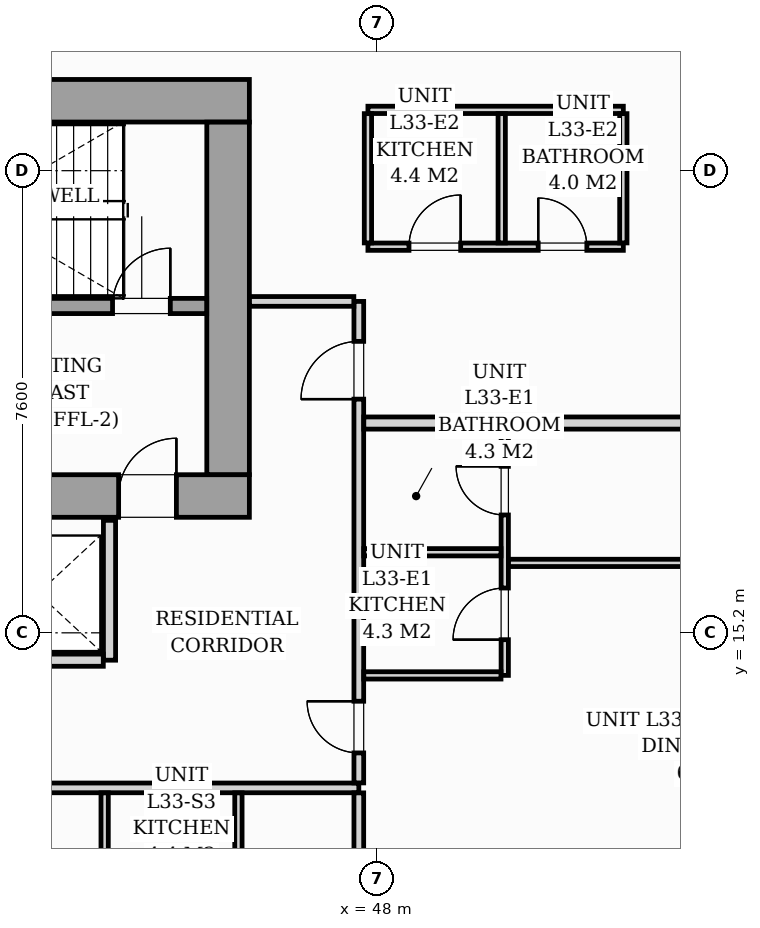
"""IFC4 building model, lengths in metres.
Left out: names, types, materials, properties, quantities, classifications, styles, units other than length and angle.
Written with IfcOpenShell. Run it as: python <this file> out.ifc"""

import sys

from ifc_helpers import new_model, si_unit, direction, frame, frame_2d, origin, origin_2d, place, context, subcontext, project, spatial, rectangle, i_section, extrude, source, transform, mapped, element, fill, save


model = new_model("IFC4")
c1 = context("Model", 3, precision=1e-05, world=origin(), true_north=direction((0.0, 1.0)))
c2 = subcontext(c1, "Body", "Model", "MODEL_VIEW")
j1 = project(units=[si_unit("LENGTHUNIT", "METRE"), si_unit("PLANEANGLEUNIT", "RADIAN")], contexts=[c1])
p1 = place(None, origin())
s1 = spatial("IfcSite", under=j1, at=p1, CompositionType="ELEMENT")
p2 = place(p1, origin())
s2 = spatial("IfcBuilding", under=s1, at=p2, CompositionType="ELEMENT")
p3 = place(p2, frame((0.0, 0.0, 116.2)))
s3 = spatial("IfcBuildingStorey", under=s2, at=p3, CompositionType="ELEMENT", Elevation=116.2)
m1 = source(origin(), c2, "Body", "SweptSolid", [
    extrude(i_section(OverallWidth=0.427, OverallDepth=0.483, WebThickness=0.051, FlangeThickness=0.082, FilletRadius=0.018, at=origin_2d()), origin(), (0.0, 0.0, 1.0), 3.196),
])
for number, where, z_axis, x_axis in (
    (1, (45.6, 17.4, 0.002), (0.0, 0.0, 1.0), (1.0, 0.0, 0.0)),
    (2, (45.6, 24.0, 0.002), (0.0, 0.0, 1.0), (1.0, 0.0, 0.0)),
):
    element("IfcColumn", number, at=place(p3, frame(where, z_axis=z_axis, x_axis=x_axis)), inside=s3, PredefinedType="PILASTER", context=c2, shape_type="MappedRepresentation", body=[
        mapped(m1, transform((0.0, 0.0, 0.0), scale=1.0)),
    ])
p4 = place(p3, frame((26.1, 17.45, 0.0), z_axis=(0.0, 0.0, 1.0), x_axis=(1.0, 0.0, 0.0)))
e3 = element("IfcWall", 3, at=p4, inside=s3, PredefinedType="SHEAR", context=c2, shape_type="SweptSolid", body=[
    extrude(rectangle(XDim=19.8, YDim=0.7, at=frame_2d((9.9, 0.0))), origin(), (0.0, 0.0, 1.0), 3.2),
])
p5 = place(p4, frame((1.05, 0.0, 0.0)))
e4 = element("IfcOpeningElement", 4, at=p5, cuts=e3, PredefinedType="OPENING", context=c2, shape_type="SweptSolid", body=[
    extrude(rectangle(XDim=0.95, YDim=2.06, at=frame_2d((0.475, 1.03))), frame((0.0, 0.36, 0.0), z_axis=(0.0, -1.0, 0.0), x_axis=(1.0, 0.0, 0.0)), (0.0, 0.0, 1.0), 0.72),
])
p6 = place(p4, frame((9.48, 0.0, 0.0)))
e5 = element("IfcOpeningElement", 5, at=p6, cuts=e3, PredefinedType="OPENING", context=c2, shape_type="SweptSolid", body=[
    extrude(rectangle(XDim=0.85, YDim=2.0, at=frame_2d((0.425, 1.0))), frame((0.0, 0.36, 0.0), z_axis=(0.0, -1.0, 0.0), x_axis=(1.0, 0.0, 0.0)), (0.0, 0.0, 1.0), 0.72),
])
p7 = place(p4, frame((17.65, 0.0, 0.0)))
e6 = element("IfcOpeningElement", 6, at=p7, cuts=e3, PredefinedType="OPENING", context=c2, shape_type="SweptSolid", body=[
    extrude(rectangle(XDim=0.95, YDim=2.06, at=frame_2d((0.475, 1.03))), frame((0.0, 0.36, 0.0), z_axis=(0.0, -1.0, 0.0), x_axis=(1.0, 0.0, 0.0)), (0.0, 0.0, 1.0), 0.72),
])
p8 = place(p3, frame((26.1, 23.95, 0.0), z_axis=(0.0, 0.0, 1.0), x_axis=(1.0, 0.0, 0.0)))
e7 = element("IfcWall", 7, at=p8, inside=s3, PredefinedType="SHEAR", context=c2, shape_type="SweptSolid", body=[
    extrude(rectangle(XDim=19.8, YDim=0.7, at=frame_2d((9.9, 0.0))), origin(), (0.0, 0.0, 1.0), 3.2),
])
p9 = place(p3, frame((45.55, 17.802, 0.0), z_axis=(0.0, 0.0, 1.0), x_axis=(0.0, 1.0, 0.0)))
e8 = element("IfcWall", 8, at=p9, inside=s3, PredefinedType="SHEAR", context=c2, shape_type="SweptSolid", body=[
    extrude(rectangle(XDim=5.796, YDim=0.7, at=frame_2d((2.898, 0.0))), origin(), (0.0, 0.0, 1.0), 3.2),
])
p10 = place(p3, frame((37.05, 20.575, 0.0), z_axis=(0.0, 0.0, 1.0), x_axis=(1.0, 0.0, 0.0)))
e9 = element("IfcWall", 9, at=p10, inside=s3, PredefinedType="SOLIDWALL", context=c2, shape_type="SweptSolid", body=[
    extrude(rectangle(XDim=8.148, YDim=0.25, at=frame_2d((4.074, 0.0))), origin(), (0.0, 0.0, 1.0), 3.2),
])
p11 = place(p10, frame((6.6, 0.0, 0.0)))
e10 = element("IfcOpeningElement", 10, at=p11, cuts=e9, PredefinedType="OPENING", context=c2, shape_type="SweptSolid", body=[
    extrude(rectangle(XDim=0.95, YDim=2.06, at=frame_2d((0.475, 1.03))), frame((0.0, 0.135, 0.0), z_axis=(0.0, -1.0, 0.0), x_axis=(1.0, 0.0, 0.0)), (0.0, 0.0, 1.0), 0.27),
])
p12 = place(p3, frame((43.6, 14.75, 0.0), z_axis=(0.0, 0.0, 1.0), x_axis=(0.0, 1.0, 0.0)))
e11 = element("IfcWall", 11, at=p12, inside=s3, PredefinedType="PARTITIONING", context=c2, shape_type="SweptSolid", body=[
    extrude(rectangle(XDim=2.3, YDim=0.2, at=frame_2d((1.15, 0.0))), origin(), (0.0, 0.0, 1.0), 2.9),
])
p13 = place(p3, frame((41.352, 14.75, 0.0), z_axis=(0.0, 0.0, 1.0), x_axis=(1.0, 0.0, 0.0)))
e12 = element("IfcWall", 12, at=p13, inside=s3, PredefinedType="PARTITIONING", context=c2, shape_type="SweptSolid", body=[
    extrude(rectangle(XDim=2.146, YDim=0.2, at=frame_2d((1.073, 0.0))), origin(), (0.0, 0.0, 1.0), 2.9),
])
p14 = place(p3, frame((21.5, 12.65, 0.0), z_axis=(0.0, 0.0, 1.0), x_axis=(1.0, 0.0, 0.0)))
e13 = element("IfcWall", 13, at=p14, inside=s3, PredefinedType="PARTITIONING", context=c2, shape_type="SweptSolid", body=[
    extrude(rectangle(XDim=26.2, YDim=0.16, at=frame_2d((13.1, 0.0))), origin(), (0.0, 0.0, 1.0), 2.9),
])
p15 = place(p14, frame((5.927, 0.0, 0.0)))
e14 = element("IfcOpeningElement", 14, at=p15, cuts=e13, PredefinedType="OPENING", context=c2, shape_type="SweptSolid", body=[
    extrude(rectangle(XDim=0.95, YDim=2.06, at=frame_2d((0.475, 1.03))), frame((0.0, 0.09, 0.0), z_axis=(0.0, -1.0, 0.0), x_axis=(1.0, 0.0, 0.0)), (0.0, 0.0, 1.0), 0.18),
])
p16 = place(p14, frame((10.575, 0.0, 0.0)))
e15 = element("IfcOpeningElement", 15, at=p16, cuts=e13, PredefinedType="OPENING", context=c2, shape_type="SweptSolid", body=[
    extrude(rectangle(XDim=0.95, YDim=2.06, at=frame_2d((0.475, 1.03))), frame((0.0, 0.09, 0.0), z_axis=(0.0, -1.0, 0.0), x_axis=(1.0, 0.0, 0.0)), (0.0, 0.0, 1.0), 0.18),
])
p17 = place(p14, frame((19.322, 0.0, 0.0)))
e16 = element("IfcOpeningElement", 16, at=p17, cuts=e13, PredefinedType="OPENING", context=c2, shape_type="SweptSolid", body=[
    extrude(rectangle(XDim=0.95, YDim=2.06, at=frame_2d((0.475, 1.03))), frame((0.0, 0.09, 0.0), z_axis=(0.0, -1.0, 0.0), x_axis=(1.0, 0.0, 0.0)), (0.0, 0.0, 1.0), 0.18),
])
p18 = place(p3, frame((47.7, 7.153, 0.0), z_axis=(0.0, 0.0, 1.0), x_axis=(0.0, 1.0, 0.0)))
e17 = element("IfcWall", 17, at=p18, inside=s3, PredefinedType="PARTITIONING", context=c2, shape_type="SweptSolid", body=[
    extrude(rectangle(XDim=5.416, YDim=0.16, at=frame_2d((2.708, 0.0))), origin(), (0.0, 0.0, 1.0), 2.9),
])
p19 = place(p3, frame((47.7, 12.732, 0.0), z_axis=(0.0, 0.0, 1.0), x_axis=(0.0, 1.0, 0.0)))
e18 = element("IfcWall", 18, at=p19, inside=s3, PredefinedType="PARTITIONING", context=c2, shape_type="SweptSolid", body=[
    extrude(rectangle(XDim=7.918, YDim=0.16, at=frame_2d((3.959, 0.0))), origin(), (0.0, 0.0, 1.0), 2.9),
])
p20 = place(p19, frame((0.493, 0.0, 0.0)))
e19 = element("IfcOpeningElement", 19, at=p20, cuts=e18, PredefinedType="OPENING", context=c2, shape_type="SweptSolid", body=[
    extrude(rectangle(XDim=0.85, YDim=2.0, at=frame_2d((0.425, 1.0))), frame((0.0, 0.09, 0.0), z_axis=(0.0, -1.0, 0.0), x_axis=(1.0, 0.0, 0.0)), (0.0, 0.0, 1.0), 0.18),
])
p21 = place(p19, frame((6.311, 0.0, 0.0)))
e20 = element("IfcOpeningElement", 20, at=p21, cuts=e18, PredefinedType="OPENING", context=c2, shape_type="SweptSolid", body=[
    extrude(rectangle(XDim=0.95, YDim=2.06, at=frame_2d((0.475, 1.03))), frame((0.0, 0.09, 0.0), z_axis=(0.0, -1.0, 0.0), x_axis=(1.0, 0.0, 0.0)), (0.0, 0.0, 1.0), 0.18),
])
p22 = place(p3, frame((45.902, 20.65, 0.0), z_axis=(0.0, 0.0, 1.0), x_axis=(1.0, 0.0, 0.0)))
e21 = element("IfcWall", 21, at=p22, inside=s3, PredefinedType="PARTITIONING", context=c2, shape_type="SweptSolid", body=[
    extrude(rectangle(XDim=1.716, YDim=0.16, at=frame_2d((0.858, 0.0))), origin(), (0.0, 0.0, 1.0), 2.9),
])
for number, where, z_axis, x_axis in (
    (22, (43.52, 10.462, 0.0), (0.0, 0.0, 1.0), (0.0, 1.0, 0.0)),
    (23, (45.72, 10.462, 0.0), (0.0, 0.0, 1.0), (0.0, 1.0, 0.0)),
):
    element("IfcWall", number, at=place(p3, frame(where, z_axis=z_axis, x_axis=x_axis)), inside=s3, PredefinedType="PARTITIONING", context=c2, shape_type="SweptSolid", body=[
        extrude(rectangle(XDim=2.106, YDim=0.12, at=frame_2d((1.053, 0.0))), origin(), (0.0, 0.0, 1.0), 2.9),
    ])
p23 = place(p3, frame((47.782, 18.65, 0.0), z_axis=(0.0, 0.0, 1.0), x_axis=(1.0, 0.0, 0.0)))
e24 = element("IfcWall", 24, at=p23, inside=s3, PredefinedType="PARTITIONING", context=c2, shape_type="SweptSolid", body=[
    extrude(rectangle(XDim=21.049, YDim=0.2, at=frame_2d((10.525, 0.0))), origin(), (0.0, 0.0, 1.0), 2.023),
])
p24 = place(p3, frame((50.1, 14.5, 0.0), z_axis=(0.0, 0.0, 1.0), x_axis=(0.0, 1.0, 0.0)))
e25 = element("IfcWall", 25, at=p24, inside=s3, PredefinedType="PARTITIONING", context=c2, shape_type="SweptSolid", body=[
    extrude(rectangle(XDim=4.048, YDim=0.12, at=frame_2d((2.024, 0.0))), origin(), (0.0, 0.0, 1.0), 2.9),
])
p25 = place(p24, frame((0.587, 0.0, 0.0)))
e26 = element("IfcOpeningElement", 26, at=p25, cuts=e25, PredefinedType="OPENING", context=c2, shape_type="SweptSolid", body=[
    extrude(rectangle(XDim=0.85, YDim=2.05, at=frame_2d((0.425, 1.025))), frame((0.0, 0.07, 0.0), z_axis=(0.0, -1.0, 0.0), x_axis=(1.0, 0.0, 0.0)), (0.0, 0.0, 1.0), 0.14),
])
p26 = place(p24, frame((2.638, 0.0, 0.0)))
e27 = element("IfcOpeningElement", 27, at=p26, cuts=e25, PredefinedType="OPENING", context=c2, shape_type="SweptSolid", body=[
    extrude(rectangle(XDim=0.8, YDim=2.0, at=frame_2d((0.4, 1.0))), frame((0.0, 0.07, 0.0), z_axis=(0.0, -1.0, 0.0), x_axis=(1.0, 0.0, 0.0)), (0.0, 0.0, 1.0), 0.14),
])
for number, where, z_axis, x_axis in (
    (28, (47.782, 16.525, 0.0), (0.0, 0.0, 1.0), (1.0, 0.0, 0.0)),
    (29, (47.782, 14.5, 0.0), (0.0, 0.0, 1.0), (1.0, 0.0, 0.0)),
):
    element("IfcWall", number, at=place(p3, frame(where, z_axis=z_axis, x_axis=x_axis)), inside=s3, PredefinedType="PARTITIONING", context=c2, shape_type="SweptSolid", body=[
        extrude(rectangle(XDim=2.256, YDim=0.12, at=frame_2d((1.128, 0.0))), origin(), (0.0, 0.0, 1.0), 2.9),
    ])
p27 = place(p3, frame((50.162, 16.35, 0.0), z_axis=(0.0, 0.0, 1.0), x_axis=(1.0, 0.0, 0.0)))
e30 = element("IfcWall", 30, at=p27, inside=s3, PredefinedType="PARTITIONING", context=c2, shape_type="SweptSolid", body=[
    extrude(rectangle(XDim=16.092, YDim=0.12, at=frame_2d((8.046, 0.0))), origin(), (0.0, 0.0, 1.0), 2.9),
])
p28 = place(p27, frame((7.621, 0.0, 0.0)))
e31 = element("IfcOpeningElement", 31, at=p28, cuts=e30, PredefinedType="OPENING", context=c2, shape_type="SweptSolid", body=[
    extrude(rectangle(XDim=0.85, YDim=2.05, at=frame_2d((0.425, 1.025))), frame((0.0, 0.07, 0.0), z_axis=(0.0, -1.0, 0.0), x_axis=(1.0, 0.0, 0.0)), (0.0, 0.0, 1.0), 0.14),
])
p29 = place(p3, frame((47.85, 21.55, 0.0), z_axis=(0.0, 0.0, 1.0), x_axis=(1.0, 0.0, 0.0)))
e32 = element("IfcWall", 32, at=p29, inside=s3, PredefinedType="PARTITIONING", context=c2, shape_type="SweptSolid", body=[
    extrude(rectangle(XDim=4.2, YDim=0.12, at=frame_2d((2.1, 0.0))), origin(), (0.0, 0.0, 1.0), 2.9),
])
p30 = place(p29, frame((0.675, 0.0, 0.0)))
e33 = element("IfcOpeningElement", 33, at=p30, cuts=e32, PredefinedType="OPENING", context=c2, shape_type="SweptSolid", body=[
    extrude(rectangle(XDim=0.85, YDim=2.05, at=frame_2d((0.425, 1.025))), frame((0.0, 0.07, 0.0), z_axis=(0.0, -1.0, 0.0), x_axis=(1.0, 0.0, 0.0)), (0.0, 0.0, 1.0), 0.14),
])
p31 = place(p29, frame((2.8, 0.0, 0.0)))
e34 = element("IfcOpeningElement", 34, at=p31, cuts=e32, PredefinedType="OPENING", context=c2, shape_type="SweptSolid", body=[
    extrude(rectangle(XDim=0.8, YDim=2.02, at=frame_2d((0.4, 1.01))), frame((0.0, 0.07, 0.0), z_axis=(0.0, -1.0, 0.0), x_axis=(1.0, 0.0, 0.0)), (0.0, 0.0, 1.0), 0.14),
])
p32 = place(p3, frame((47.85, 23.8, 0.0), z_axis=(0.0, 0.0, 1.0), x_axis=(1.0, 0.0, 0.0)))
e35 = element("IfcWall", 35, at=p32, inside=s3, PredefinedType="PARTITIONING", context=c2, shape_type="SweptSolid", body=[
    extrude(rectangle(XDim=4.2, YDim=0.12, at=frame_2d((2.1, 0.0))), origin(), (0.0, 0.0, 1.0), 2.9),
])
for number, where, z_axis, x_axis in (
    (36, (47.85, 21.612, 0.0), (0.0, 0.0, 1.0), (0.0, 1.0, 0.0)),
    (37, (50.05, 21.612, 0.0), (0.0, 0.0, 1.0), (0.0, 1.0, 0.0)),
    (38, (52.05, 21.612, 0.0), (0.0, 0.0, 1.0), (0.0, 1.0, 0.0)),
):
    element("IfcWall", number, at=place(p3, frame(where, z_axis=z_axis, x_axis=x_axis)), inside=s3, PredefinedType="PARTITIONING", context=c2, shape_type="SweptSolid", body=[
        extrude(rectangle(XDim=2.126, YDim=0.12, at=frame_2d((1.063, 0.0))), origin(), (0.0, 0.0, 1.0), 2.9),
    ])
m2 = source(origin(), c2, "Body", "SweptSolid", [
    extrude(rectangle(XDim=0.95, YDim=2.06, at=frame_2d((0.475, 1.03))), frame((0.0, 0.025, 0.0), z_axis=(0.0, -1.0, 0.0), x_axis=(1.0, 0.0, 0.0)), (0.0, 0.0, 1.0), 0.05),
])
p33 = place(p7, origin())
e39 = element("IfcDoor", 39, at=p33, inside=s3, OperationType="SINGLE_SWING_RIGHT", PredefinedType="DOOR", context=c2, shape_type="MappedRepresentation", body=[
    mapped(m2, transform((0.0, 0.0, 0.0), scale=1.0)),
])
fill(e6, e39)
p34 = place(p11, origin())
e40 = element("IfcDoor", 40, at=p34, inside=s3, OperationType="SINGLE_SWING_RIGHT", PredefinedType="DOOR", context=c2, shape_type="MappedRepresentation", body=[
    mapped(m2, transform((0.0, 0.0, 0.0), scale=1.0)),
])
fill(e10, e40)
m3 = source(origin(), c2, "Body", "SweptSolid", [
    extrude(rectangle(XDim=0.85, YDim=2.0, at=frame_2d((0.425, 1.0))), frame((0.0, 0.025, 0.0), z_axis=(0.0, -1.0, 0.0), x_axis=(1.0, 0.0, 0.0)), (0.0, 0.0, 1.0), 0.05),
])
p35 = place(p20, origin())
e41 = element("IfcDoor", 41, at=p35, inside=s3, OperationType="SINGLE_SWING_RIGHT", PredefinedType="DOOR", context=c2, shape_type="MappedRepresentation", body=[
    mapped(m3, transform((0.0, 0.0, 0.0), scale=1.0)),
])
fill(e19, e41)
m4 = source(origin(), c2, "Body", "SweptSolid", [
    extrude(rectangle(XDim=0.85, YDim=2.05, at=frame_2d((0.425, 1.025))), frame((0.0, 0.025, 0.0), z_axis=(0.0, -1.0, 0.0), x_axis=(1.0, 0.0, 0.0)), (0.0, 0.0, 1.0), 0.05),
])
p36 = place(p25, origin())
e42 = element("IfcDoor", 42, at=p36, inside=s3, OperationType="SINGLE_SWING_LEFT", PredefinedType="DOOR", context=c2, shape_type="MappedRepresentation", body=[
    mapped(m4, transform((0.0, 0.0, 0.0), scale=1.0)),
])
fill(e26, e42)
m5 = source(origin(), c2, "Body", "SweptSolid", [
    extrude(rectangle(XDim=0.8, YDim=2.0, at=frame_2d((0.4, 1.0))), frame((0.0, 0.025, 0.0), z_axis=(0.0, -1.0, 0.0), x_axis=(1.0, 0.0, 0.0)), (0.0, 0.0, 1.0), 0.05),
])
p37 = place(p26, origin())
e43 = element("IfcDoor", 43, at=p37, inside=s3, OperationType="SINGLE_SWING_RIGHT", PredefinedType="DOOR", context=c2, shape_type="MappedRepresentation", body=[
    mapped(m5, transform((0.0, 0.0, 0.0), scale=1.0)),
])
fill(e27, e43)
m6 = source(origin(), c2, "Body", "SweptSolid", [
    extrude(rectangle(XDim=0.95, YDim=2.06, at=frame_2d((0.475, 1.03))), frame((0.0, 0.025, 0.0), z_axis=(0.0, -1.0, 0.0), x_axis=(1.0, 0.0, 0.0)), (0.0, 0.0, 1.0), 0.05),
])
p38 = place(p21, origin())
e44 = element("IfcDoor", 44, at=p38, inside=s3, OperationType="SINGLE_SWING_LEFT", PredefinedType="DOOR", context=c2, shape_type="MappedRepresentation", body=[
    mapped(m6, transform((0.0, 0.0, 0.0), scale=1.0)),
])
fill(e20, e44)
p39 = place(p30, origin())
e45 = element("IfcDoor", 45, at=p39, inside=s3, OperationType="SINGLE_SWING_RIGHT", PredefinedType="DOOR", context=c2, shape_type="MappedRepresentation", body=[
    mapped(m4, transform((0.0, 0.0, 0.0), scale=1.0)),
])
fill(e33, e45)
m7 = source(origin(), c2, "Body", "SweptSolid", [
    extrude(rectangle(XDim=0.8, YDim=2.02, at=frame_2d((0.4, 1.01))), frame((0.0, 0.025, 0.0), z_axis=(0.0, -1.0, 0.0), x_axis=(1.0, 0.0, 0.0)), (0.0, 0.0, 1.0), 0.05),
])
p40 = place(p31, origin())
e46 = element("IfcDoor", 46, at=p40, inside=s3, OperationType="SINGLE_SWING_LEFT", PredefinedType="DOOR", context=c2, shape_type="MappedRepresentation", body=[
    mapped(m7, transform((0.0, 0.0, 0.0), scale=1.0)),
])
fill(e34, e46)
save(model, sys.argv[1])
